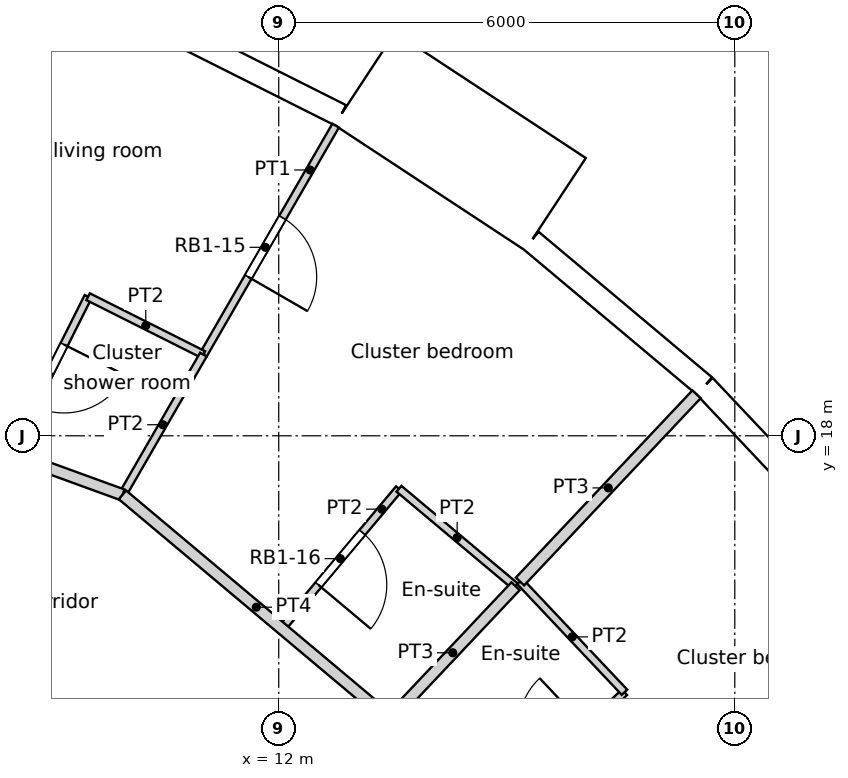
"""IFC4 building model, lengths in metres.
Left out: names, types, materials, properties, quantities, classifications, styles, units other than length and angle.
Written with IfcOpenShell. Run it as: python <this file> out.ifc"""

import sys

from ifc_helpers import new_model, si_unit, direction, frame, frame_2d, origin, origin_2d, place, context, subcontext, project, spatial, rectangle, circle, extrude, element, fill, save


model = new_model("IFC4")
c1 = context("Model", 3, precision=1e-05, world=origin(), true_north=direction((0.0, 1.0)))
c2 = subcontext(c1, "Body", "Model", "MODEL_VIEW")
j1 = project(units=[si_unit("LENGTHUNIT", "METRE"), si_unit("PLANEANGLEUNIT", "RADIAN")], contexts=[c1])
p1 = place(None, origin())
s1 = spatial("IfcSite", under=j1, at=p1, CompositionType="ELEMENT")
p2 = place(p1, origin())
s2 = spatial("IfcBuilding", under=s1, at=p2, CompositionType="ELEMENT")
p3 = place(p2, frame((0.0, 0.0, 126.0)))
s3 = spatial("IfcBuildingStorey", under=s2, at=p3, CompositionType="ELEMENT", Elevation=126.0)
for number, where, z_axis, x_axis in (
    (1, (18.805, 15.779, 0.0), (0.0, 0.0, 1.0), (1.0, 0.0, 0.0)),
    (2, (14.659, 19.69, 0.0), (0.0, 0.0, 1.0), (1.0, 0.0, 0.0)),
    (3, (9.723, 22.54, 0.0), (0.0, 0.0, 1.0), (1.0, 0.0, 0.0)),
):
    element("IfcColumn", number, at=place(p3, frame(where, z_axis=z_axis, x_axis=x_axis)), inside=s3, PredefinedType="COLUMN", context=c2, shape_type="SweptSolid", body=[
        extrude(circle(Radius=0.6, at=origin_2d()), origin(), (0.0, 0.0, 1.0), 3.6),
    ])
p4 = place(p3, frame((11.735, 14.716, 0.0), z_axis=(0.0, 0.0, 1.0), x_axis=(1.0, 0.0, 0.0)))
e4 = element("IfcColumn", 4, at=p4, inside=s3, PredefinedType="COLUMN", context=c2, shape_type="SweptSolid", body=[
    extrude(circle(Radius=0.65, at=origin_2d()), origin(), (0.0, 0.0, 1.0), 3.6),
])
p5 = place(p3, frame((19.64, 16.493, 0.0), z_axis=(0.0, 0.0, 1.0), x_axis=(-0.686235184166, 0.727379730273, 0.0)))
e5 = element("IfcWall", 5, at=p5, inside=s3, PredefinedType="SOLIDWALL", context=c2, shape_type="SweptSolid", body=[
    extrude(rectangle(XDim=2.973, YDim=0.3, at=frame_2d((1.486, 0.0))), origin(), (0.0, 0.0, 1.0), 3.3),
])
p6 = place(p5, frame((1.486, 0.0, 1.55)))
e6 = element("IfcOpeningElement", 6, at=p6, cuts=e5, PredefinedType="OPENING", context=c2, shape_type="SweptSolid", body=[
    extrude(circle(Radius=0.9, at=origin_2d()), frame((0.0, 0.16, 0.0), z_axis=(0.0, -1.0, 0.0), x_axis=(1.0, 0.0, 0.0)), (0.0, 0.0, 1.0), 0.32),
])
p7 = place(p3, frame((17.6, 18.655, 0.0), z_axis=(0.0, 0.0, 1.0), x_axis=(-0.766049350637, 0.642781761089, 0.0)))
e7 = element("IfcWall", 7, at=p7, inside=s3, PredefinedType="SOLIDWALL", context=c2, shape_type="SweptSolid", body=[
    extrude(rectangle(XDim=2.973, YDim=0.3, at=frame_2d((1.486, 0.0))), origin(), (0.0, 0.0, 1.0), 3.3),
])
p8 = place(p7, frame((1.486, 0.0, 1.55)))
e8 = element("IfcOpeningElement", 8, at=p8, cuts=e7, PredefinedType="OPENING", context=c2, shape_type="SweptSolid", body=[
    extrude(circle(Radius=0.9, at=origin_2d()), frame((0.0, 0.16, 0.0), z_axis=(0.0, -1.0, 0.0), x_axis=(1.0, 0.0, 0.0)), (0.0, 0.0, 1.0), 0.32),
])
p9 = place(p3, frame((15.639, 21.048, -0.3), z_axis=(0.0, 0.0, 1.0), x_axis=(-0.835514416706, 0.549468524554, 0.0)))
e9 = element("IfcWall", 9, at=p9, inside=s3, PredefinedType="ELEMENTEDWALL", context=c2, shape_type="SweptSolid", body=[
    extrude(rectangle(XDim=3.0, YDim=1.45, at=frame_2d((1.5, 0.0))), origin(), (0.0, 0.0, 1.0), 3.6),
])
p10 = place(p9, frame((1.5, 0.0, 1.85)))
e10 = element("IfcOpeningElement", 10, at=p10, cuts=e9, PredefinedType="OPENING", context=c2, shape_type="SweptSolid", body=[
    extrude(circle(Radius=0.9, at=origin_2d()), frame((0.0, 0.735, 0.0), z_axis=(0.0, -1.0, 0.0), x_axis=(1.0, 0.0, 0.0)), (0.0, 0.0, 1.0), 1.47),
])
p11 = place(p3, frame((12.815, 22.216, 0.0), z_axis=(0.0, 0.0, 1.0), x_axis=(-0.893637442555, 0.448789618045, 0.0)))
e11 = element("IfcWall", 11, at=p11, inside=s3, PredefinedType="SOLIDWALL", context=c2, shape_type="SweptSolid", body=[
    extrude(rectangle(XDim=2.973, YDim=0.3, at=frame_2d((1.486, 0.0))), origin(), (0.0, 0.0, 1.0), 3.3),
])
p12 = place(p11, frame((1.486, 0.0, 1.55)))
e12 = element("IfcOpeningElement", 12, at=p12, cuts=e11, PredefinedType="OPENING", context=c2, shape_type="SweptSolid", body=[
    extrude(circle(Radius=0.9, at=origin_2d()), frame((0.0, 0.16, 0.0), z_axis=(0.0, -1.0, 0.0), x_axis=(1.0, 0.0, 0.0)), (0.0, 0.0, 1.0), 0.32),
])
p13 = place(p3, frame((4.452, 16.614, 0.0), z_axis=(0.0, 0.0, 1.0), x_axis=(0.866005203721, -0.500034985904, 0.0)))
e13 = element("IfcWall", 13, at=p13, inside=s3, PredefinedType="PARTITIONING", context=c2, shape_type="SweptSolid", body=[
    extrude(rectangle(XDim=8.903, YDim=0.15, at=frame_2d((4.452, 0.0))), origin(), (0.0, 0.0, 1.0), 3.3),
])
p14 = place(p3, frame((3.453, 19.586, 0.0), z_axis=(0.0, 0.0, 1.0), x_axis=(0.939706711967, -0.341981425643, 0.0)))
e14 = element("IfcWall", 14, at=p14, inside=s3, PredefinedType="PARTITIONING", context=c2, shape_type="SweptSolid", body=[
    extrude(rectangle(XDim=6.908, YDim=0.15, at=frame_2d((3.454, 0.0))), origin(), (0.0, 0.0, 1.0), 3.3),
])
p15 = place(p14, frame((0.608, 0.0, 0.0)))
e15 = element("IfcOpeningElement", 15, at=p15, cuts=e14, PredefinedType="OPENING", context=c2, shape_type="SweptSolid", body=[
    extrude(rectangle(XDim=1.1, YDim=2.1, at=frame_2d((0.55, 1.05))), frame((0.0, 0.075, 0.0), z_axis=(0.0, -1.0, 0.0), x_axis=(1.0, 0.0, 0.0)), (0.0, 0.0, 1.0), 0.15),
])
p16 = place(p3, frame((9.944, 17.223, 0.0), z_axis=(0.0, 0.0, 1.0), x_axis=(0.765940168638, -0.642911858708, 0.0)))
e16 = element("IfcWall", 16, at=p16, inside=s3, PredefinedType="PARTITIONING", context=c2, shape_type="SweptSolid", body=[
    extrude(rectangle(XDim=4.598, YDim=0.15, at=frame_2d((2.299, 0.0))), origin(), (0.0, 0.0, 1.0), 3.3),
])
p17 = place(p3, frame((14.896, 13.068, 0.0), z_axis=(0.0, 0.0, 1.0), x_axis=(0.727754926423, 0.68583727448, 0.0)))
e17 = element("IfcWall", 17, at=p17, inside=s3, PredefinedType="PARTITIONING", context=c2, shape_type="SweptSolid", body=[
    extrude(rectangle(XDim=2.271, YDim=0.1, at=frame_2d((1.136, 0.0))), origin(), (0.0, 0.0, 1.0), 3.3),
])
p18 = place(p17, frame((0.686, 0.0, 0.0)))
e18 = element("IfcOpeningElement", 18, at=p18, cuts=e17, PredefinedType="OPENING", context=c2, shape_type="SweptSolid", body=[
    extrude(rectangle(XDim=0.9, YDim=2.04, at=frame_2d((0.45, 1.02))), frame((0.0, 0.05, 0.0), z_axis=(0.0, -1.0, 0.0), x_axis=(1.0, 0.0, 0.0)), (0.0, 0.0, 1.0), 0.1),
])
p19 = place(p3, frame((15.174, 16.083, 0.0), z_axis=(0.0, 0.0, 1.0), x_axis=(0.686337209023, -0.727283462971, 0.0)))
e19 = element("IfcWall", 19, at=p19, inside=s3, PredefinedType="PARTITIONING", context=c2, shape_type="SweptSolid", body=[
    extrude(rectangle(XDim=2.003, YDim=0.1, at=frame_2d((1.002, 0.0))), origin(), (0.0, 0.0, 1.0), 3.3),
])
p20 = place(p3, frame((15.174, 16.083, 0.0), z_axis=(0.0, 0.0, 1.0), x_axis=(0.686144834043, 0.727464959099, 0.0)))
e20 = element("IfcWall", 20, at=p20, inside=s3, PredefinedType="PARTITIONING", context=c2, shape_type="SweptSolid", body=[
    extrude(rectangle(XDim=3.385, YDim=0.15, at=frame_2d((1.693, 0.0))), origin(), (0.0, 0.0, 1.0), 3.3),
])
p21 = place(p3, frame((13.463, 14.27, 0.0), z_axis=(0.0, 0.0, 1.0), x_axis=(0.686486574862, 0.727142477465, 0.0)))
e21 = element("IfcWall", 21, at=p21, inside=s3, PredefinedType="PARTITIONING", context=c2, shape_type="SweptSolid", body=[
    extrude(rectangle(XDim=2.408, YDim=0.15, at=frame_2d((1.204, 0.0))), origin(), (0.0, 0.0, 1.0), 3.3),
])
p22 = place(p3, frame((9.492, 19.83, 0.0), z_axis=(0.0, 0.0, 1.0), x_axis=(0.893620418257, -0.44882351551, 0.0)))
e22 = element("IfcWall", 22, at=p22, inside=s3, PredefinedType="PARTITIONING", context=c2, shape_type="SweptSolid", body=[
    extrude(rectangle(XDim=1.698, YDim=0.1, at=frame_2d((0.849, 0.0))), origin(), (0.0, 0.0, 1.0), 3.3),
])
p23 = place(p3, frame((8.455, 17.765, 0.0), z_axis=(0.0, 0.0, 1.0), x_axis=(0.448692072555, 0.893686423768, 0.0)))
e23 = element("IfcWall", 23, at=p23, inside=s3, PredefinedType="PARTITIONING", context=c2, shape_type="SweptSolid", body=[
    extrude(rectangle(XDim=2.311, YDim=0.1, at=frame_2d((1.155, 0.0))), origin(), (0.0, 0.0, 1.0), 3.3),
])
p24 = place(p23, frame((0.706, 0.0, 0.0)))
e24 = element("IfcOpeningElement", 24, at=p24, cuts=e23, PredefinedType="OPENING", context=c2, shape_type="SweptSolid", body=[
    extrude(rectangle(XDim=0.9, YDim=2.0, at=frame_2d((0.45, 1.0))), frame((0.0, 0.05, 0.0), z_axis=(0.0, -1.0, 0.0), x_axis=(1.0, 0.0, 0.0)), (0.0, 0.0, 1.0), 0.1),
])
p25 = place(p3, frame((11.009, 19.068, 0.0), z_axis=(0.0, 0.0, 1.0), x_axis=(0.500101058546, 0.865967049743, 0.0)))
e25 = element("IfcWall", 25, at=p25, inside=s3, PredefinedType="PARTITIONING", context=c2, shape_type="SweptSolid", body=[
    extrude(rectangle(XDim=3.479, YDim=0.1, at=frame_2d((1.74, 0.0))), origin(), (0.0, 0.0, 1.0), 3.3),
])
p26 = place(p25, frame((1.18, 0.0, 0.0)))
e26 = element("IfcOpeningElement", 26, at=p26, cuts=e25, PredefinedType="OPENING", context=c2, shape_type="SweptSolid", body=[
    extrude(rectangle(XDim=0.9, YDim=2.1, at=frame_2d((0.45, 1.05))), frame((0.0, 0.05, 0.0), z_axis=(0.0, -1.0, 0.0), x_axis=(1.0, 0.0, 0.0)), (0.0, 0.0, 1.0), 0.1),
])
p27 = place(p3, frame((9.944, 17.223, 0.0), z_axis=(0.0, 0.0, 1.0), x_axis=(0.499861334108, 0.866105447774, 0.0)))
e27 = element("IfcWall", 27, at=p27, inside=s3, PredefinedType="PARTITIONING", context=c2, shape_type="SweptSolid", body=[
    extrude(rectangle(XDim=2.13, YDim=0.1, at=frame_2d((1.065, 0.0))), origin(), (0.0, 0.0, 1.0), 3.3),
])
p28 = place(p3, frame((13.582, 17.303, 0.0), z_axis=(0.0, 0.0, 1.0), x_axis=(0.766224532916, -0.642572925945, 0.0)))
e28 = element("IfcWall", 28, at=p28, inside=s3, PredefinedType="PARTITIONING", context=c2, shape_type="SweptSolid", body=[
    extrude(rectangle(XDim=1.998, YDim=0.1, at=frame_2d((0.999, 0.0))), origin(), (0.0, 0.0, 1.0), 3.3),
])
p29 = place(p3, frame((12.04, 15.465, 0.0), z_axis=(0.0, 0.0, 1.0), x_axis=(0.642743296644, 0.766081623993, 0.0)))
e29 = element("IfcWall", 29, at=p29, inside=s3, PredefinedType="PARTITIONING", context=c2, shape_type="SweptSolid", body=[
    extrude(rectangle(XDim=2.399, YDim=0.1, at=frame_2d((1.2, 0.0))), origin(), (0.0, 0.0, 1.0), 3.3),
])
p30 = place(p29, frame((0.749, 0.0, 0.0)))
e30 = element("IfcOpeningElement", 30, at=p30, cuts=e29, PredefinedType="OPENING", context=c2, shape_type="SweptSolid", body=[
    extrude(rectangle(XDim=0.9, YDim=2.04, at=frame_2d((0.45, 1.02))), frame((0.0, 0.05, 0.0), z_axis=(0.0, -1.0, 0.0), x_axis=(1.0, 0.0, 0.0)), (0.0, 0.0, 1.0), 0.1),
])
p31 = place(p6, origin())
e31 = element("IfcWindow", 31, at=p31, inside=s3, PartitioningType="SINGLE_PANEL", PredefinedType="WINDOW", context=c2, shape_type="SweptSolid", body=[
    extrude(circle(Radius=0.9, at=origin_2d()), frame((0.0, 0.12, 0.0), z_axis=(0.0, -1.0, 0.0), x_axis=(1.0, 0.0, 0.0)), (0.0, 0.0, 1.0), 0.1),
])
fill(e6, e31)
p32 = place(p8, origin())
e32 = element("IfcWindow", 32, at=p32, inside=s3, PartitioningType="SINGLE_PANEL", PredefinedType="WINDOW", context=c2, shape_type="SweptSolid", body=[
    extrude(circle(Radius=0.9, at=origin_2d()), frame((0.0, 0.12, 0.0), z_axis=(0.0, -1.0, 0.0), x_axis=(1.0, 0.0, 0.0)), (0.0, 0.0, 1.0), 0.1),
])
fill(e8, e32)
p33 = place(p10, origin())
e33 = element("IfcWindow", 33, at=p33, inside=s3, PartitioningType="SINGLE_PANEL", PredefinedType="WINDOW", context=c2, shape_type="SweptSolid", body=[
    extrude(circle(Radius=0.9, at=origin_2d()), frame((0.0, 0.695, 0.0), z_axis=(0.0, -1.0, 0.0), x_axis=(1.0, 0.0, 0.0)), (0.0, 0.0, 1.0), 0.1),
])
fill(e10, e33)
p34 = place(p12, origin())
e34 = element("IfcWindow", 34, at=p34, inside=s3, PartitioningType="SINGLE_PANEL", PredefinedType="WINDOW", context=c2, shape_type="SweptSolid", body=[
    extrude(circle(Radius=0.9, at=origin_2d()), frame((0.0, 0.12, 0.0), z_axis=(0.0, -1.0, 0.0), x_axis=(1.0, 0.0, 0.0)), (0.0, 0.0, 1.0), 0.1),
])
fill(e12, e34)
p35 = place(p24, origin())
e35 = element("IfcDoor", 35, at=p35, inside=s3, OperationType="SINGLE_SWING_LEFT", PredefinedType="DOOR", context=c2, shape_type="SweptSolid", body=[
    extrude(rectangle(XDim=0.9, YDim=2.0, at=frame_2d((0.45, 1.0))), frame((0.0, 0.025, 0.0), z_axis=(0.0, -1.0, 0.0), x_axis=(1.0, 0.0, 0.0)), (0.0, 0.0, 1.0), 0.05),
])
fill(e24, e35)
p36 = place(p26, origin())
e36 = element("IfcDoor", 36, at=p36, inside=s3, OperationType="SINGLE_SWING_RIGHT", PredefinedType="DOOR", context=c2, shape_type="SweptSolid", body=[
    extrude(rectangle(XDim=0.9, YDim=2.1, at=frame_2d((0.45, 1.05))), frame((0.0, 0.025, 0.0), z_axis=(0.0, -1.0, 0.0), x_axis=(1.0, 0.0, 0.0)), (0.0, 0.0, 1.0), 0.05),
])
fill(e26, e36)
p37 = place(p30, origin())
e37 = element("IfcDoor", 37, at=p37, inside=s3, OperationType="SINGLE_SWING_RIGHT", PredefinedType="DOOR", context=c2, shape_type="SweptSolid", body=[
    extrude(rectangle(XDim=0.9, YDim=2.04, at=frame_2d((0.45, 1.02))), frame((0.0, 0.025, 0.0), z_axis=(0.0, -1.0, 0.0), x_axis=(1.0, 0.0, 0.0)), (0.0, 0.0, 1.0), 0.05),
])
fill(e30, e37)
save(model, sys.argv[1])
